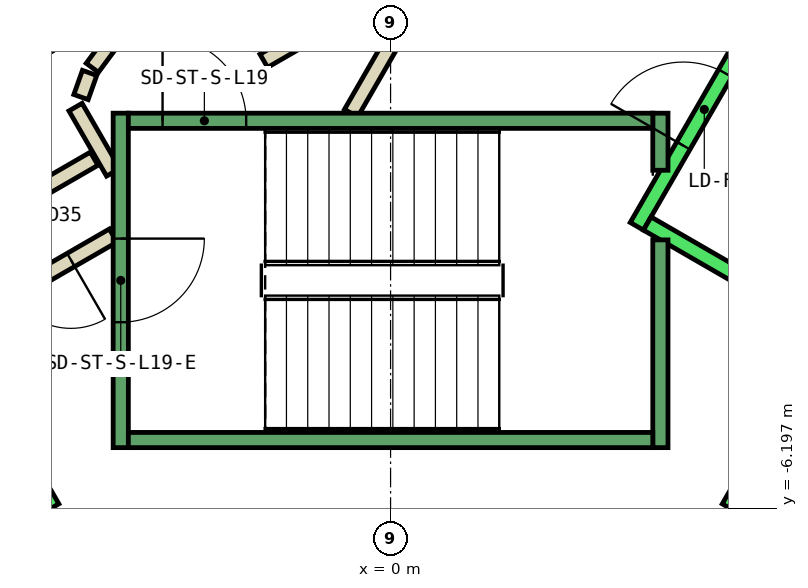
"""IFC4 building model, lengths in metres.
Left out: names, types, materials, properties, quantities, classifications, styles, units other than length and angle.
Written with IfcOpenShell. Run it as: python <this file> out.ifc"""

import sys

from ifc_helpers import new_model, si_unit, direction, frame, frame_2d, origin, place, context, subcontext, project, spatial, rectangle, extrude, element, fill, save


model = new_model("IFC4")
c1 = context("Model", 3, precision=1e-05, world=origin(), true_north=direction((0.0, 1.0)))
c2 = subcontext(c1, "Body", "Model", "MODEL_VIEW")
j1 = project(units=[si_unit("LENGTHUNIT", "METRE"), si_unit("PLANEANGLEUNIT", "RADIAN")], contexts=[c1])
p1 = place(None, origin())
s1 = spatial("IfcSite", under=j1, at=p1, CompositionType="ELEMENT")
p2 = place(p1, origin())
s2 = spatial("IfcBuilding", under=s1, at=p2, CompositionType="ELEMENT")
p3 = place(p2, frame((0.0, 0.0, 90.8)))
s3 = spatial("IfcBuildingStorey", under=s2, at=p3, CompositionType="ELEMENT", Elevation=90.8)
p4 = place(p3, frame((-3.9, -1.599, 0.0), z_axis=(0.0, 0.0, 1.0), x_axis=(-0.865969445389, -0.500096910261, 0.0)))
e1 = element("IfcWall", 1, at=p4, inside=s3, PredefinedType="PARTITIONING", context=c2, shape_type="SweptSolid", body=[
    extrude(rectangle(XDim=1.373, YDim=0.2, at=frame_2d((0.687, 0.0))), origin(), (0.0, 0.0, 1.0), 3.8),
])
p5 = place(p3, frame((-3.65, -2.61, 0.0), z_axis=(0.0, 0.0, 1.0), x_axis=(-0.866072462134, -0.499918483688, 0.0)))
e2 = element("IfcWall", 2, at=p5, inside=s3, PredefinedType="PARTITIONING", context=c2, shape_type="SweptSolid", body=[
    extrude(rectangle(XDim=2.084, YDim=0.2, at=frame_2d((1.042, 0.0))), origin(), (0.0, 0.0, 1.0), 3.8),
])
p6 = place(p5, frame((0.642, 0.0, 0.0)))
e3 = element("IfcOpeningElement", 3, at=p6, cuts=e2, PredefinedType="OPENING", context=c2, shape_type="SweptSolid", body=[
    extrude(rectangle(XDim=0.9, YDim=2.1, at=frame_2d((0.45, 1.05))), frame((0.0, 0.11, 0.0), z_axis=(0.0, -1.0, 0.0), x_axis=(1.0, 0.0, 0.0)), (0.0, 0.0, 1.0), 0.22),
])
p7 = place(p3, frame((-4.145, -0.92, 0.0), z_axis=(0.0, 0.0, 1.0), x_axis=(0.499743786207, -0.866173278362, 0.0)))
e4 = element("IfcWall", 4, at=p7, inside=s3, PredefinedType="PARTITIONING", context=c2, shape_type="SweptSolid", body=[
    extrude(rectangle(XDim=0.991, YDim=0.2, at=frame_2d((0.495, 0.0))), origin(), (0.0, 0.0, 1.0), 3.8),
])
p8 = place(p3, frame((-0.52, -1.0, 0.0), z_axis=(0.0, 0.0, 1.0), x_axis=(0.50011622646, 0.865958290007, 0.0)))
e5 = element("IfcWall", 5, at=p8, inside=s3, PredefinedType="PARTITIONING", context=c2, shape_type="SweptSolid", body=[
    extrude(rectangle(XDim=4.991, YDim=0.2, at=frame_2d((2.496, 0.0))), origin(), (0.0, 0.0, 1.0), 3.8),
])
p9 = place(p8, frame((1.945, 0.0, 0.0)))
e6 = element("IfcOpeningElement", 6, at=p9, cuts=e5, PredefinedType="OPENING", context=c2, shape_type="SweptSolid", body=[
    extrude(rectangle(XDim=1.0, YDim=2.1, at=frame_2d((0.5, 1.05))), frame((0.0, 0.11, 0.0), z_axis=(0.0, -1.0, 0.0), x_axis=(1.0, 0.0, 0.0)), (0.0, 0.0, 1.0), 0.22),
])
p10 = place(p3, frame((-0.412, 0.414, 0.0), z_axis=(0.0, 0.0, 1.0), x_axis=(-0.866017369001, -0.500013916395, 0.0)))
e7 = element("IfcWall", 7, at=p10, inside=s3, PredefinedType="PARTITIONING", context=c2, shape_type="SweptSolid", body=[
    extrude(rectangle(XDim=1.45, YDim=0.2, at=frame_2d((0.725, 0.0))), origin(), (0.0, 0.0, 1.0), 3.8),
])
p11 = place(p3, frame((-3.723, -0.131, 0.0), z_axis=(0.0, 0.0, 1.0), x_axis=(-0.594675113454, -0.803966112121, 0.0)))
e8 = element("IfcWall", 8, at=p11, inside=s3, PredefinedType="PARTITIONING", context=c2, shape_type="SweptSolid", body=[
    extrude(rectangle(XDim=0.338, YDim=0.2, at=frame_2d((0.169, 0.0))), origin(), (0.0, 0.0, 1.0), 3.8),
])
p12 = place(p3, frame((-3.96, -0.47, 0.0), z_axis=(0.0, 0.0, 1.0), x_axis=(-0.334824194261, -0.942280615813, 0.0)))
e9 = element("IfcWall", 9, at=p12, inside=s3, PredefinedType="PARTITIONING", context=c2, shape_type="SweptSolid", body=[
    extrude(rectangle(XDim=0.338, YDim=0.2, at=frame_2d((0.169, 0.0))), origin(), (0.0, 0.0, 1.0), 3.8),
])
p13 = place(p3, frame((-9.751, 2.99, 0.0), z_axis=(0.0, 0.0, 1.0), x_axis=(0.50000090737, -0.866024879913, 0.0)))
e10 = element("IfcWall", 10, at=p13, inside=s3, PredefinedType="STANDARD", context=c2, shape_type="SweptSolid", body=[
    extrude(rectangle(XDim=10.6, YDim=0.2, at=frame_2d((5.3, 0.0))), origin(), (0.0, 0.0, 1.0), 3.8),
])
p14 = place(p3, frame((3.24, -2.488, 0.0), z_axis=(0.0, 0.0, 1.0), x_axis=(0.49994636267, 0.866056369097, 0.0)))
e11 = element("IfcWall", 11, at=p14, inside=s3, PredefinedType="STANDARD", context=c2, shape_type="SweptSolid", body=[
    extrude(rectangle(XDim=2.8, YDim=0.2, at=frame_2d((1.4, 0.0))), origin(), (0.0, 0.0, 1.0), 3.8),
])
p15 = place(p14, frame((1.225, 0.0, 0.0)))
e12 = element("IfcOpeningElement", 12, at=p15, cuts=e11, PredefinedType="OPENING", context=c2, shape_type="SweptSolid", body=[
    extrude(rectangle(XDim=1.1, YDim=2.1, at=frame_2d((0.55, 1.05))), frame((0.0, 0.11, 0.0), z_axis=(0.0, -1.0, 0.0), x_axis=(1.0, 0.0, 0.0)), (0.0, 0.0, 1.0), 0.22),
])
p16 = place(p3, frame((3.377, -2.452, 0.0), z_axis=(0.0, 0.0, 1.0), x_axis=(0.865955154139, -0.50012165622, 0.0)))
e13 = element("IfcWall", 13, at=p16, inside=s3, PredefinedType="STANDARD", context=c2, shape_type="SweptSolid", body=[
    extrude(rectangle(XDim=2.4, YDim=0.2, at=frame_2d((1.2, 0.0))), origin(), (0.0, 0.0, 1.0), 3.8),
])
p17 = place(p3, frame((4.451, -6.19, 0.0), z_axis=(0.0, 0.0, 1.0), x_axis=(0.50000090737, 0.866024879913, 0.0)))
e14 = element("IfcWall", 14, at=p17, inside=s3, PredefinedType="STANDARD", context=c2, shape_type="SweptSolid", body=[
    extrude(rectangle(XDim=10.6, YDim=0.2, at=frame_2d((5.3, 0.0))), origin(), (0.0, 0.0, 1.0), 3.8),
])
p18 = place(p3, frame((-3.55, -1.0, 0.0), z_axis=(0.0, 0.0, 1.0), x_axis=(0.0, -1.0, 0.0)))
e15 = element("IfcWall", 15, at=p18, inside=s3, PredefinedType="STANDARD", context=c2, shape_type="SweptSolid", body=[
    extrude(rectangle(XDim=4.4, YDim=0.2, at=frame_2d((2.2, 0.0))), origin(), (0.0, 0.0, 1.0), 3.8),
])
p19 = place(p18, frame((1.65, 0.0, 0.0)))
e16 = element("IfcOpeningElement", 16, at=p19, cuts=e15, PredefinedType="OPENING", context=c2, shape_type="SweptSolid", body=[
    extrude(rectangle(XDim=1.1, YDim=2.2, at=frame_2d((0.55, 1.1))), frame((0.0, 0.11, 0.0), z_axis=(0.0, -1.0, 0.0), x_axis=(1.0, 0.0, 0.0)), (0.0, 0.0, 1.0), 0.22),
])
p20 = place(p3, frame((3.55, -2.667, 0.0), z_axis=(0.0, 0.0, 1.0), x_axis=(0.0, -1.0, 0.0)))
e17 = element("IfcWall", 17, at=p20, inside=s3, PredefinedType="STANDARD", context=c2, shape_type="SweptSolid", body=[
    extrude(rectangle(XDim=2.733, YDim=0.2, at=frame_2d((1.366, 0.0))), origin(), (0.0, 0.0, 1.0), 3.8),
])
p21 = place(p3, frame((3.55, -1.0, 0.0), z_axis=(0.0, 0.0, 1.0), x_axis=(0.0, -1.0, 0.0)))
e18 = element("IfcWall", 18, at=p21, inside=s3, PredefinedType="STANDARD", context=c2, shape_type="SweptSolid", body=[
    extrude(rectangle(XDim=0.751, YDim=0.2, at=frame_2d((0.375, 0.0))), origin(), (0.0, 0.0, 1.0), 3.8),
])
p22 = place(p3, frame((-3.45, -1.1, 0.0), z_axis=(0.0, 0.0, 1.0), x_axis=(1.0, 0.0, 0.0)))
e19 = element("IfcWall", 19, at=p22, inside=s3, PredefinedType="STANDARD", context=c2, shape_type="SweptSolid", body=[
    extrude(rectangle(XDim=6.9, YDim=0.2, at=frame_2d((3.45, 0.0))), origin(), (0.0, 0.0, 1.0), 3.8),
])
p23 = place(p22, frame((0.45, 0.0, 0.0)))
e20 = element("IfcOpeningElement", 20, at=p23, cuts=e19, PredefinedType="OPENING", context=c2, shape_type="SweptSolid", body=[
    extrude(rectangle(XDim=1.1, YDim=2.2, at=frame_2d((0.55, 1.1))), frame((0.0, 0.11, 0.0), z_axis=(0.0, -1.0, 0.0), x_axis=(1.0, 0.0, 0.0)), (0.0, 0.0, 1.0), 0.22),
])
p24 = place(p3, frame((-3.45, -5.3, 0.0), z_axis=(0.0, 0.0, 1.0), x_axis=(1.0, 0.0, 0.0)))
e21 = element("IfcWall", 21, at=p24, inside=s3, PredefinedType="STANDARD", context=c2, shape_type="SweptSolid", body=[
    extrude(rectangle(XDim=6.9, YDim=0.2, at=frame_2d((3.45, 0.0))), origin(), (0.0, 0.0, 1.0), 3.8),
])
p25 = place(p6, origin())
e22 = element("IfcDoor", 22, at=p25, inside=s3, OperationType="SINGLE_SWING_LEFT", PredefinedType="DOOR", context=c2, shape_type="SweptSolid", body=[
    extrude(rectangle(XDim=0.9, YDim=2.1, at=frame_2d((0.45, 1.05))), frame((0.0, 0.025, 0.0), z_axis=(0.0, -1.0, 0.0), x_axis=(1.0, 0.0, 0.0)), (0.0, 0.0, 1.0), 0.05),
])
fill(e3, e22)
p26 = place(p15, origin())
e23 = element("IfcDoor", 23, at=p26, inside=s3, OperationType="SLIDING_TO_LEFT", PredefinedType="DOOR", context=c2, shape_type="SweptSolid", body=[
    extrude(rectangle(XDim=1.1, YDim=2.1, at=frame_2d((0.55, 1.05))), frame((0.0, 0.025, 0.0), z_axis=(0.0, -1.0, 0.0), x_axis=(1.0, 0.0, 0.0)), (0.0, 0.0, 1.0), 0.05),
])
fill(e12, e23)
p27 = place(p23, origin())
e24 = element("IfcDoor", 24, at=p27, inside=s3, OperationType="SINGLE_SWING_LEFT", PredefinedType="DOOR", context=c2, shape_type="SweptSolid", body=[
    extrude(rectangle(XDim=1.1, YDim=2.2, at=frame_2d((0.55, 1.1))), frame((0.0, 0.025, 0.0), z_axis=(0.0, -1.0, 0.0), x_axis=(1.0, 0.0, 0.0)), (0.0, 0.0, 1.0), 0.05),
])
fill(e20, e24)
p28 = place(p19, origin())
e25 = element("IfcDoor", 25, at=p28, inside=s3, OperationType="SINGLE_SWING_LEFT", PredefinedType="DOOR", context=c2, shape_type="SweptSolid", body=[
    extrude(rectangle(XDim=1.1, YDim=2.2, at=frame_2d((0.55, 1.1))), frame((0.0, 0.025, 0.0), z_axis=(0.0, -1.0, 0.0), x_axis=(1.0, 0.0, 0.0)), (0.0, 0.0, 1.0), 0.05),
])
fill(e16, e25)
save(model, sys.argv[1])
